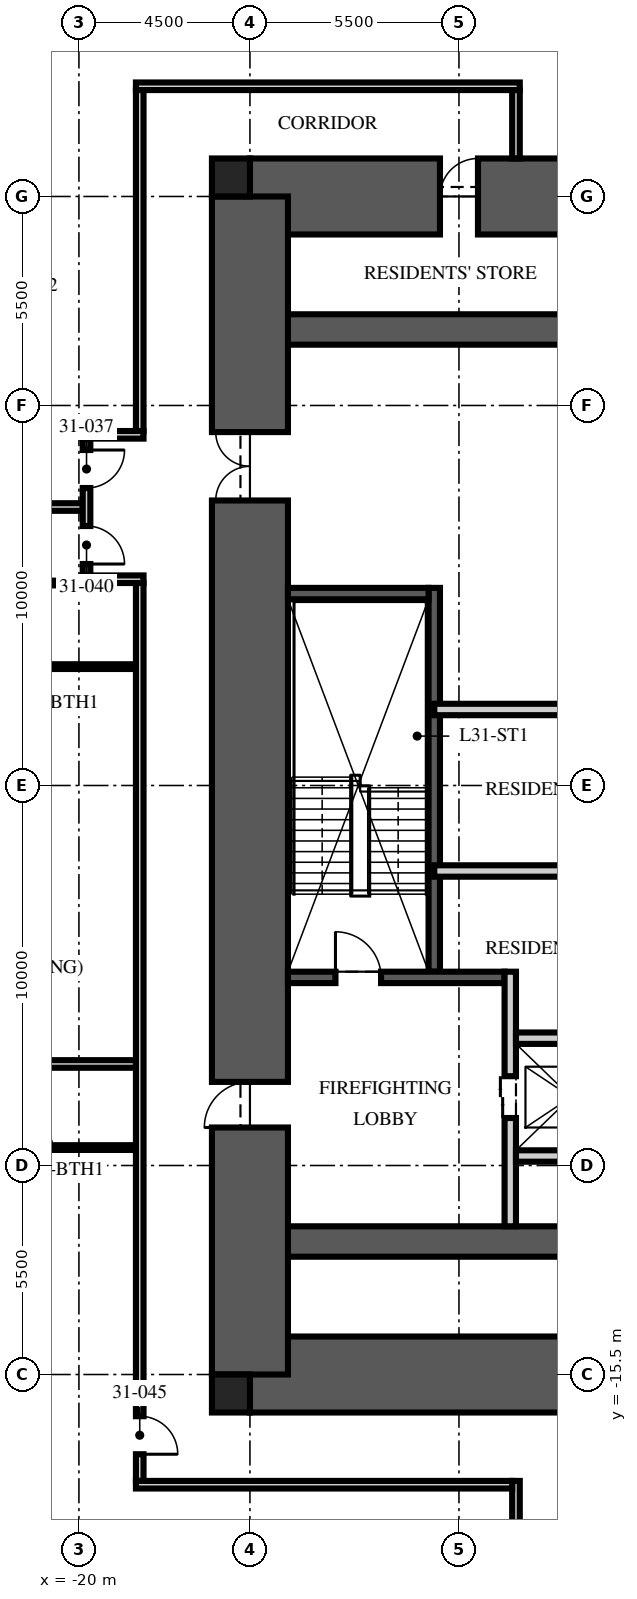
"""IFC4 building model, lengths in metres.
Left out: names, types, materials, properties, quantities, classifications, styles, units other than length and angle.
Written with IfcOpenShell. Run it as: python <this file> out.ifc"""

import sys

from ifc_helpers import new_model, si_unit, direction, frame, frame_2d, origin, origin_2d, place, context, subcontext, project, spatial, rectangle, extrude, element, fill, save


model = new_model("IFC4")
c1 = context("Model", 3, precision=1e-05, world=origin(), true_north=direction((0.0, 1.0)))
c2 = subcontext(c1, "Body", "Model", "MODEL_VIEW")
j1 = project(units=[si_unit("LENGTHUNIT", "METRE"), si_unit("PLANEANGLEUNIT", "RADIAN")], contexts=[c1])
p1 = place(None, origin())
s1 = spatial("IfcSite", under=j1, at=p1, CompositionType="ELEMENT")
p2 = place(p1, origin())
s2 = spatial("IfcBuilding", under=s1, at=p2, CompositionType="ELEMENT")
p3 = place(p2, frame((0.0, 0.0, 126.0)))
s3 = spatial("IfcBuildingStorey", under=s2, at=p3, CompositionType="ELEMENT", Elevation=126.0)
p4 = place(p3, frame((-15.5, 15.5, -0.25), z_axis=(0.0, 0.0, 1.0), x_axis=(1.0, 0.0, 0.0)))
e1 = element("IfcWall", 1, at=p4, inside=s3, PredefinedType="SHEAR", context=c2, shape_type="SweptSolid", body=[
    extrude(rectangle(XDim=31.0, YDim=2.0, at=frame_2d((15.5, 0.0))), origin(), (0.0, 0.0, 1.0), 3.75),
])
p5 = place(p4, frame((5.0, 0.0, 0.25)))
e2 = element("IfcOpeningElement", 2, at=p5, cuts=e1, PredefinedType="OPENING", context=c2, shape_type="SweptSolid", body=[
    extrude(rectangle(XDim=1.0, YDim=2.1, at=frame_2d((0.5, 1.05))), frame((0.0, 1.01, 0.0), z_axis=(0.0, -1.0, 0.0), x_axis=(1.0, 0.0, 0.0)), (0.0, 0.0, 1.0), 2.02),
])
p6 = place(p3, frame((-15.5, -15.5, -0.25), z_axis=(0.0, 0.0, 1.0), x_axis=(1.0, 0.0, 0.0)))
e3 = element("IfcWall", 3, at=p6, inside=s3, PredefinedType="SHEAR", context=c2, shape_type="SweptSolid", body=[
    extrude(rectangle(XDim=31.0, YDim=2.0, at=frame_2d((15.5, 0.0))), origin(), (0.0, 0.0, 1.0), 3.75),
])
p7 = place(p6, frame((10.4, 0.0, 0.25)))
e4 = element("IfcOpeningElement", 4, at=p7, cuts=e3, PredefinedType="OPENING", context=c2, shape_type="SweptSolid", body=[
    extrude(rectangle(XDim=1.1, YDim=2.1, at=frame_2d((0.55, 1.05))), frame((0.0, 1.01, 0.0), z_axis=(0.0, -1.0, 0.0), x_axis=(1.0, 0.0, 0.0)), (0.0, 0.0, 1.0), 2.02),
])
p8 = place(p6, frame((13.5, 0.0, 0.25)))
e5 = element("IfcOpeningElement", 5, at=p8, cuts=e3, PredefinedType="OPENING", context=c2, shape_type="SweptSolid", body=[
    extrude(rectangle(XDim=1.1, YDim=2.1, at=frame_2d((0.55, 1.05))), frame((0.0, 1.01, 0.0), z_axis=(0.0, -1.0, 0.0), x_axis=(1.0, 0.0, 0.0)), (0.0, 0.0, 1.0), 2.02),
])
p9 = place(p6, frame((16.6, 0.0, 0.25)))
e6 = element("IfcOpeningElement", 6, at=p9, cuts=e3, PredefinedType="OPENING", context=c2, shape_type="SweptSolid", body=[
    extrude(rectangle(XDim=1.1, YDim=2.1, at=frame_2d((0.55, 1.05))), frame((0.0, 1.01, 0.0), z_axis=(0.0, -1.0, 0.0), x_axis=(1.0, 0.0, 0.0)), (0.0, 0.0, 1.0), 2.02),
])
for number, where, z_axis, x_axis in (
    (7, (-15.5, 12.0, -0.25), (0.0, 0.0, 1.0), (1.0, 0.0, 0.0)),
    (8, (-15.5, -12.0, -0.25), (0.0, 0.0, 1.0), (1.0, 0.0, 0.0)),
):
    element("IfcWall", number, at=place(p3, frame(where, z_axis=z_axis, x_axis=x_axis)), inside=s3, PredefinedType="SHEAR", context=c2, shape_type="SweptSolid", body=[
        extrude(rectangle(XDim=31.0, YDim=0.8, at=frame_2d((15.5, 0.0))), origin(), (0.0, 0.0, 1.0), 3.75),
    ])
p10 = place(p3, frame((-15.5, -15.5, -0.25), z_axis=(0.0, 0.0, 1.0), x_axis=(0.0, 1.0, 0.0)))
e9 = element("IfcWall", 9, at=p10, inside=s3, PredefinedType="SHEAR", context=c2, shape_type="SweptSolid", body=[
    extrude(rectangle(XDim=31.0, YDim=2.0, at=frame_2d((15.5, 0.0))), origin(), (0.0, 0.0, 1.0), 3.75),
])
p11 = place(p10, frame((6.5, 0.0, 0.25)))
e10 = element("IfcOpeningElement", 10, at=p11, cuts=e9, PredefinedType="OPENING", context=c2, shape_type="SweptSolid", body=[
    extrude(rectangle(XDim=1.2, YDim=2.1, at=frame_2d((0.6, 1.05))), frame((0.0, 1.01, 0.0), z_axis=(0.0, -1.0, 0.0), x_axis=(1.0, 0.0, 0.0)), (0.0, 0.0, 1.0), 2.02),
])
p12 = place(p10, frame((23.0, 0.0, 0.25)))
e11 = element("IfcOpeningElement", 11, at=p12, cuts=e9, PredefinedType="OPENING", context=c2, shape_type="SweptSolid", body=[
    extrude(rectangle(XDim=1.8, YDim=2.1, at=frame_2d((0.9, 1.05))), frame((0.0, 1.01, 0.0), z_axis=(0.0, -1.0, 0.0), x_axis=(1.0, 0.0, 0.0)), (0.0, 0.0, 1.0), 2.02),
])
for number, where, z_axis, x_axis in (
    (12, (-16.0, 16.0, -0.25), (0.0, 0.0, 1.0), (1.0, 0.0, 0.0)),
    (13, (-16.0, -16.0, -0.25), (0.0, 0.0, 1.0), (1.0, 0.0, 0.0)),
):
    element("IfcColumn", number, at=place(p3, frame(where, z_axis=z_axis, x_axis=x_axis)), inside=s3, PredefinedType="COLUMN", context=c2, shape_type="SweptSolid", body=[
        extrude(rectangle(XDim=1.0, YDim=1.0, at=origin_2d()), origin(), (0.0, 0.0, 1.0), 3.75),
    ])
p13 = place(p3, frame((-10.65, -4.9, 0.0), z_axis=(0.0, 0.0, 1.0), x_axis=(0.0, 1.0, 0.0)))
e14 = element("IfcWall", 14, at=p13, inside=s3, PredefinedType="SOLIDWALL", context=c2, shape_type="SweptSolid", body=[
    extrude(rectangle(XDim=10.1, YDim=0.3, at=frame_2d((5.05, 0.0))), origin(), (0.0, 0.0, 1.0), 3.5),
])
p14 = place(p3, frame((-14.5, -5.05, 0.0), z_axis=(0.0, 0.0, 1.0), x_axis=(1.0, 0.0, 0.0)))
e15 = element("IfcWall", 15, at=p14, inside=s3, PredefinedType="SOLIDWALL", context=c2, shape_type="SweptSolid", body=[
    extrude(rectangle(XDim=5.7, YDim=0.3, at=frame_2d((2.85, 0.0))), origin(), (0.0, 0.0, 1.0), 3.5),
])
p15 = place(p14, frame((1.25, 0.0, 0.0)))
e16 = element("IfcOpeningElement", 16, at=p15, cuts=e15, PredefinedType="OPENING", context=c2, shape_type="SweptSolid", body=[
    extrude(rectangle(XDim=1.2, YDim=2.1, at=frame_2d((0.6, 1.05))), frame((0.0, 0.16, 0.0), z_axis=(0.0, -1.0, 0.0), x_axis=(1.0, 0.0, 0.0)), (0.0, 0.0, 1.0), 0.32),
])
p16 = place(p3, frame((-14.5, 5.05, 0.0), z_axis=(0.0, 0.0, 1.0), x_axis=(1.0, 0.0, 0.0)))
e17 = element("IfcWall", 17, at=p16, inside=s3, PredefinedType="SOLIDWALL", context=c2, shape_type="SweptSolid", body=[
    extrude(rectangle(XDim=3.7, YDim=0.3, at=frame_2d((1.85, 0.0))), origin(), (0.0, 0.0, 1.0), 3.5),
])
p17 = place(p3, frame((-8.65, -11.6, 0.0), z_axis=(0.0, 0.0, 1.0), x_axis=(0.0, 1.0, 0.0)))
e18 = element("IfcWall", 18, at=p17, inside=s3, PredefinedType="PARTITIONING", context=c2, shape_type="SweptSolid", body=[
    extrude(rectangle(XDim=6.7, YDim=0.3, at=frame_2d((3.35, 0.0))), origin(), (0.0, 0.0, 1.0), 3.5),
])
p18 = place(p17, frame((2.85, 0.0, 0.0)))
e19 = element("IfcOpeningElement", 19, at=p18, cuts=e18, PredefinedType="OPENING", context=c2, shape_type="SweptSolid", body=[
    extrude(rectangle(XDim=1.1, YDim=2.1, at=frame_2d((0.55, 1.05))), frame((0.0, 0.16, 0.0), z_axis=(0.0, -1.0, 0.0), x_axis=(1.0, 0.0, 0.0)), (0.0, 0.0, 1.0), 0.32),
])
p19 = place(p3, frame((-8.5, -6.65, 0.0), z_axis=(0.0, 0.0, 1.0), x_axis=(1.0, 0.0, 0.0)))
e20 = element("IfcWall", 20, at=p19, inside=s3, PredefinedType="PARTITIONING", context=c2, shape_type="SweptSolid", body=[
    extrude(rectangle(XDim=17.0, YDim=0.3, at=frame_2d((8.5, 0.0))), origin(), (0.0, 0.0, 1.0), 3.5),
])
p20 = place(p19, frame((7.8, 0.0, 0.0)))
e21 = element("IfcOpeningElement", 21, at=p20, cuts=e20, PredefinedType="OPENING", context=c2, shape_type="SweptSolid", body=[
    extrude(rectangle(XDim=1.3, YDim=2.4, at=frame_2d((0.65, 1.2))), frame((0.0, 0.16, 0.0), z_axis=(0.0, -1.0, 0.0), x_axis=(1.0, 0.0, 0.0)), (0.0, 0.0, 1.0), 0.32),
])
p21 = place(p19, frame((5.65, 0.0, 0.0)))
e22 = element("IfcOpeningElement", 22, at=p21, cuts=e20, PredefinedType="OPENING", context=c2, shape_type="SweptSolid", body=[
    extrude(rectangle(XDim=0.9, YDim=2.1, at=frame_2d((0.45, 1.05))), frame((0.0, 0.16, 0.0), z_axis=(0.0, -1.0, 0.0), x_axis=(1.0, 0.0, 0.0)), (0.0, 0.0, 1.0), 0.32),
])
p22 = place(p19, frame((10.4, 0.0, 0.0)))
e23 = element("IfcOpeningElement", 23, at=p22, cuts=e20, PredefinedType="OPENING", context=c2, shape_type="SweptSolid", body=[
    extrude(rectangle(XDim=0.9, YDim=2.1, at=frame_2d((0.45, 1.05))), frame((0.0, 0.16, 0.0), z_axis=(0.0, -1.0, 0.0), x_axis=(1.0, 0.0, 0.0)), (0.0, 0.0, 1.0), 0.32),
])
p23 = place(p3, frame((-8.5, -9.75, 0.0), z_axis=(0.0, 0.0, 1.0), x_axis=(1.0, 0.0, 0.0)))
e24 = element("IfcWall", 24, at=p23, inside=s3, PredefinedType="PARTITIONING", context=c2, shape_type="SweptSolid", body=[
    extrude(rectangle(XDim=2.9, YDim=0.3, at=frame_2d((1.45, 0.0))), origin(), (0.0, 0.0, 1.0), 3.5),
])
p24 = place(p3, frame((-10.65, 2.0, 0.0), z_axis=(0.0, 0.0, 1.0), x_axis=(1.0, 0.0, 0.0)))
e25 = element("IfcWall", 25, at=p24, inside=s3, PredefinedType="PARTITIONING", context=c2, shape_type="SweptSolid", body=[
    extrude(rectangle(XDim=21.3, YDim=0.3, at=frame_2d((10.65, 0.0))), origin(), (0.0, 0.0, 1.0), 3.5),
])
p25 = place(p24, frame((10.05, 0.0, 0.0)))
e26 = element("IfcOpeningElement", 26, at=p25, cuts=e25, PredefinedType="OPENING", context=c2, shape_type="SweptSolid", body=[
    extrude(rectangle(XDim=1.2, YDim=2.1, at=frame_2d((0.6, 1.05))), frame((0.0, 0.16, 0.0), z_axis=(0.0, -1.0, 0.0), x_axis=(1.0, 0.0, 0.0)), (0.0, 0.0, 1.0), 0.32),
])
p26 = place(p24, frame((18.942, 0.0, 0.0)))
e27 = element("IfcOpeningElement", 27, at=p26, cuts=e25, PredefinedType="OPENING", context=c2, shape_type="SweptSolid", body=[
    extrude(rectangle(XDim=0.9, YDim=2.1, at=frame_2d((0.45, 1.05))), frame((0.0, 0.16, 0.0), z_axis=(0.0, -1.0, 0.0), x_axis=(1.0, 0.0, 0.0)), (0.0, 0.0, 1.0), 0.32),
])
p27 = place(p3, frame((-10.65, -2.25, 0.0), z_axis=(0.0, 0.0, 1.0), x_axis=(1.0, 0.0, 0.0)))
e28 = element("IfcWall", 28, at=p27, inside=s3, PredefinedType="PARTITIONING", context=c2, shape_type="SweptSolid", body=[
    extrude(rectangle(XDim=7.35, YDim=0.3, at=frame_2d((3.675, 0.0))), origin(), (0.0, 0.0, 1.0), 3.5),
])
p28 = place(p3, frame((-18.5, 18.4, 0.0), z_axis=(0.0, 0.0, 1.0), x_axis=(1.0, 0.0, 0.0)))
e29 = element("IfcWall", 29, at=p28, inside=s3, PredefinedType="PARTITIONING", context=c2, shape_type="SweptSolid", body=[
    extrude(rectangle(XDim=10.1, YDim=0.2, at=frame_2d((5.05, 0.0))), origin(), (0.0, 0.0, 1.0), 2.3),
])
p29 = place(p3, frame((-8.5, 18.3, 0.0), z_axis=(0.0, 0.0, 1.0), x_axis=(0.0, -1.0, 0.0)))
e30 = element("IfcWall", 30, at=p29, inside=s3, PredefinedType="PARTITIONING", context=c2, shape_type="SweptSolid", body=[
    extrude(rectangle(XDim=1.8, YDim=0.2, at=frame_2d((0.9, 0.0))), origin(), (0.0, 0.0, 1.0), 3.5),
])
p30 = place(p3, frame((-19.9, 7.328, 0.0), z_axis=(0.0, 0.0, 1.0), x_axis=(-1.0, 0.0, 0.0)))
e31 = element("IfcWall", 31, at=p30, inside=s3, PredefinedType="PARTITIONING", context=c2, shape_type="SweptSolid", body=[
    extrude(rectangle(XDim=9.0, YDim=0.2, at=frame_2d((4.5, 0.0))), origin(), (0.0, 0.0, 1.0), 2.81),
])
p31 = place(p3, frame((-18.5, -7.328, 0.0), z_axis=(0.0, 0.0, 1.0), x_axis=(-1.0, 0.0, 0.0)))
e32 = element("IfcWall", 32, at=p31, inside=s3, PredefinedType="PARTITIONING", context=c2, shape_type="SweptSolid", body=[
    extrude(rectangle(XDim=10.4, YDim=0.2, at=frame_2d((5.2, 0.0))), origin(), (0.0, 0.0, 1.0), 2.81),
])
p32 = place(p3, frame((-19.97, 5.328, 0.0), z_axis=(0.0, 0.0, 1.0), x_axis=(-1.0, 0.0, 0.0)))
e33 = element("IfcWall", 33, at=p32, inside=s3, PredefinedType="PARTITIONING", context=c2, shape_type="SweptSolid", body=[
    extrude(rectangle(XDim=2.81, YDim=0.125, at=frame_2d((1.405, 0.0))), origin(), (0.0, 0.0, 1.0), 3.5),
])
for number, where, z_axis, x_axis in (
    (34, (-18.5, 3.128, 0.0), (0.0, 0.0, 1.0), (-1.0, 0.0, 0.0)),
    (35, (-18.5, -9.528, 0.0), (0.0, 0.0, 1.0), (-1.0, 0.0, 0.0)),
):
    element("IfcWall", number, at=place(p3, frame(where, z_axis=z_axis, x_axis=x_axis)), inside=s3, PredefinedType="PARTITIONING", context=c2, shape_type="SweptSolid", body=[
        extrude(rectangle(XDim=4.28, YDim=0.125, at=frame_2d((2.14, 0.0))), origin(), (0.0, 0.0, 1.0), 3.5),
    ])
p33 = place(p3, frame((-18.4, 18.3, 0.0), z_axis=(0.0, 0.0, 1.0), x_axis=(0.0, -1.0, 0.0)))
e36 = element("IfcWall", 36, at=p33, inside=s3, PredefinedType="PARTITIONING", context=c2, shape_type="SweptSolid", body=[
    extrude(rectangle(XDim=8.972, YDim=0.2, at=frame_2d((4.486, 0.0))), origin(), (0.0, 0.0, 1.0), 2.3),
])
p34 = place(p3, frame((-18.3, 9.228, 0.0), z_axis=(0.0, 0.0, 1.0), x_axis=(-1.0, 0.0, 0.0)))
e37 = element("IfcWall", 37, at=p34, inside=s3, PredefinedType="PARTITIONING", context=c2, shape_type="SweptSolid", body=[
    extrude(rectangle(XDim=1.6, YDim=0.2, at=frame_2d((0.8, 0.0))), origin(), (0.0, 0.0, 1.0), 2.7),
])
p35 = place(p3, frame((-18.3, 5.428, 0.0), z_axis=(0.0, 0.0, 1.0), x_axis=(-1.0, 0.0, 0.0)))
e38 = element("IfcWall", 38, at=p35, inside=s3, PredefinedType="PARTITIONING", context=c2, shape_type="SweptSolid", body=[
    extrude(rectangle(XDim=1.6, YDim=0.2, at=frame_2d((0.8, 0.0))), origin(), (0.0, 0.0, 1.0), 3.5),
])
p36 = place(p3, frame((-19.8, 9.128, 0.0), z_axis=(0.0, 0.0, 1.0), x_axis=(0.0, -1.0, 0.0)))
e39 = element("IfcWall", 39, at=p36, inside=s3, PredefinedType="PARTITIONING", context=c2, shape_type="SweptSolid", body=[
    extrude(rectangle(XDim=3.6, YDim=0.2, at=frame_2d((1.8, 0.0))), origin(), (0.0, 0.0, 1.0), 2.7),
])
p37 = place(p36, frame((0.3, 0.0, 0.0)))
e40 = element("IfcOpeningElement", 40, at=p37, cuts=e39, PredefinedType="OPENING", context=c2, shape_type="SweptSolid", body=[
    extrude(rectangle(XDim=1.0, YDim=2.2, at=frame_2d((0.5, 1.1))), frame((0.0, 0.11, 0.0), z_axis=(0.0, -1.0, 0.0), x_axis=(1.0, 0.0, 0.0)), (0.0, 0.0, 1.0), 0.22),
])
p38 = place(p36, frame((2.3, 0.0, 0.0)))
e41 = element("IfcOpeningElement", 41, at=p38, cuts=e39, PredefinedType="OPENING", context=c2, shape_type="SweptSolid", body=[
    extrude(rectangle(XDim=1.0, YDim=2.2, at=frame_2d((0.5, 1.1))), frame((0.0, 0.11, 0.0), z_axis=(0.0, -1.0, 0.0), x_axis=(1.0, 0.0, 0.0)), (0.0, 0.0, 1.0), 0.22),
])
p39 = place(p3, frame((-18.4, 5.328, 0.0), z_axis=(0.0, 0.0, 1.0), x_axis=(0.0, -1.0, 0.0)))
e42 = element("IfcWall", 42, at=p39, inside=s3, PredefinedType="PARTITIONING", context=c2, shape_type="SweptSolid", body=[
    extrude(rectangle(XDim=23.628, YDim=0.2, at=frame_2d((11.814, 0.0))), origin(), (0.0, 0.0, 1.0), 2.3),
])
p40 = place(p39, frame((21.926, 0.0, 0.0)))
e43 = element("IfcOpeningElement", 43, at=p40, cuts=e42, PredefinedType="OPENING", context=c2, shape_type="SweptSolid", body=[
    extrude(rectangle(XDim=1.0, YDim=2.2, at=frame_2d((0.5, 1.1))), frame((0.0, 0.11, 0.0), z_axis=(0.0, -1.0, 0.0), x_axis=(1.0, 0.0, 0.0)), (0.0, 0.0, 1.0), 0.22),
])
p41 = place(p3, frame((-8.5, -18.3, 0.0), z_axis=(0.0, 0.0, 1.0), x_axis=(0.0, -1.0, 0.0)))
e44 = element("IfcWall", 44, at=p41, inside=s3, PredefinedType="PARTITIONING", context=c2, shape_type="SweptSolid", body=[
    extrude(rectangle(XDim=3.0, YDim=0.2, at=frame_2d((1.5, 0.0))), origin(), (0.0, 0.0, 1.0), 3.5),
])
p42 = place(p3, frame((-8.6, -18.4, 0.0), z_axis=(0.0, 0.0, 1.0), x_axis=(-1.0, 0.0, 0.0)))
e45 = element("IfcWall", 45, at=p42, inside=s3, PredefinedType="PARTITIONING", context=c2, shape_type="SweptSolid", body=[
    extrude(rectangle(XDim=9.9, YDim=0.2, at=frame_2d((4.95, 0.0))), origin(), (0.0, 0.0, 1.0), 2.3),
])
p43 = place(p15, origin())
e46 = element("IfcDoor", 46, at=p43, inside=s3, OperationType="SINGLE_SWING_LEFT", PredefinedType="DOOR", context=c2, shape_type="SweptSolid", body=[
    extrude(rectangle(XDim=1.2, YDim=2.1, at=frame_2d((0.6, 1.05))), frame((0.0, 0.025, 0.0), z_axis=(0.0, -1.0, 0.0), x_axis=(1.0, 0.0, 0.0)), (0.0, 0.0, 1.0), 0.05),
])
fill(e16, e46)
p44 = place(p11, origin())
e47 = element("IfcDoor", 47, at=p44, inside=s3, OperationType="SINGLE_SWING_LEFT", PredefinedType="DOOR", context=c2, shape_type="SweptSolid", body=[
    extrude(rectangle(XDim=1.2, YDim=2.1, at=frame_2d((0.6, 1.05))), frame((0.0, 0.025, 0.0), z_axis=(0.0, -1.0, 0.0), x_axis=(1.0, 0.0, 0.0)), (0.0, 0.0, 1.0), 0.05),
])
fill(e10, e47)
p45 = place(p12, origin())
e48 = element("IfcDoor", 48, at=p45, inside=s3, OperationType="DOUBLE_DOOR_SINGLE_SWING", PredefinedType="DOOR", context=c2, shape_type="SweptSolid", body=[
    extrude(rectangle(XDim=1.8, YDim=2.1, at=frame_2d((0.9, 1.05))), frame((0.0, 0.025, 0.0), z_axis=(0.0, -1.0, 0.0), x_axis=(1.0, 0.0, 0.0)), (0.0, 0.0, 1.0), 0.05),
])
fill(e11, e48)
p46 = place(p18, origin())
e49 = element("IfcDoor", 49, at=p46, inside=s3, OperationType="DOUBLE_DOOR_SLIDING", PredefinedType="DOOR", context=c2, shape_type="SweptSolid", body=[
    extrude(rectangle(XDim=1.1, YDim=2.1, at=frame_2d((0.55, 1.05))), frame((0.0, 0.025, 0.0), z_axis=(0.0, -1.0, 0.0), x_axis=(1.0, 0.0, 0.0)), (0.0, 0.0, 1.0), 0.05),
])
fill(e19, e49)
p47 = place(p5, origin())
e50 = element("IfcDoor", 50, at=p47, inside=s3, OperationType="SINGLE_SWING_RIGHT", PredefinedType="DOOR", context=c2, shape_type="SweptSolid", body=[
    extrude(rectangle(XDim=1.0, YDim=2.1, at=frame_2d((0.5, 1.05))), frame((0.0, 0.025, 0.0), z_axis=(0.0, -1.0, 0.0), x_axis=(1.0, 0.0, 0.0)), (0.0, 0.0, 1.0), 0.05),
])
fill(e2, e50)
p48 = place(p37, origin())
e51 = element("IfcDoor", 51, at=p48, inside=s3, OperationType="SINGLE_SWING_LEFT", PredefinedType="DOOR", context=c2, shape_type="SweptSolid", body=[
    extrude(rectangle(XDim=1.0, YDim=2.2, at=frame_2d((0.5, 1.1))), frame((0.0, 0.025, 0.0), z_axis=(0.0, -1.0, 0.0), x_axis=(1.0, 0.0, 0.0)), (0.0, 0.0, 1.0), 0.05),
])
fill(e40, e51)
p49 = place(p38, origin())
e52 = element("IfcDoor", 52, at=p49, inside=s3, OperationType="SINGLE_SWING_RIGHT", PredefinedType="DOOR", context=c2, shape_type="SweptSolid", body=[
    extrude(rectangle(XDim=1.0, YDim=2.2, at=frame_2d((0.5, 1.1))), frame((0.0, 0.025, 0.0), z_axis=(0.0, -1.0, 0.0), x_axis=(1.0, 0.0, 0.0)), (0.0, 0.0, 1.0), 0.05),
])
fill(e41, e52)
p50 = place(p40, origin())
e53 = element("IfcDoor", 53, at=p50, inside=s3, OperationType="SINGLE_SWING_RIGHT", PredefinedType="DOOR", context=c2, shape_type="SweptSolid", body=[
    extrude(rectangle(XDim=1.0, YDim=2.2, at=frame_2d((0.5, 1.1))), frame((0.0, 0.025, 0.0), z_axis=(0.0, -1.0, 0.0), x_axis=(1.0, 0.0, 0.0)), (0.0, 0.0, 1.0), 0.05),
])
fill(e43, e53)
save(model, sys.argv[1])
